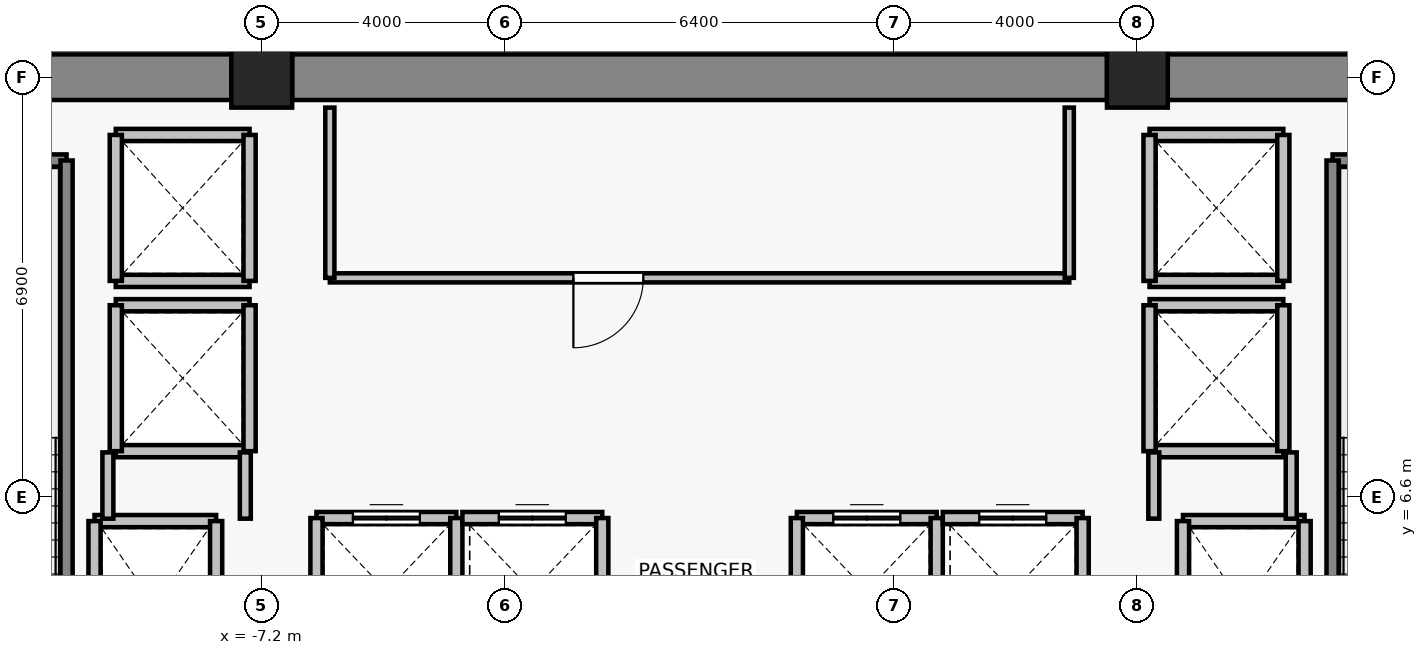
"""IFC4 building model, lengths in metres.
Left out: names, types, materials, properties, quantities, classifications, styles, units other than length and angle.
Written with IfcOpenShell. Run it as: python <this file> out.ifc"""

import sys

from ifc_helpers import new_model, si_unit, direction, frame, frame_2d, origin, origin_2d, place, context, subcontext, project, spatial, rectangle, extrude, source, transform, mapped, element, fill, save


model = new_model("IFC4")
c1 = context("Model", 3, precision=1e-05, world=origin(), true_north=direction((0.0, 1.0)))
c2 = subcontext(c1, "Body", "Model", "MODEL_VIEW")
j1 = project(units=[si_unit("LENGTHUNIT", "METRE"), si_unit("PLANEANGLEUNIT", "RADIAN")], contexts=[c1])
p1 = place(None, origin())
s1 = spatial("IfcSite", under=j1, at=p1, CompositionType="ELEMENT")
p2 = place(p1, origin())
s2 = spatial("IfcBuilding", under=s1, at=p2, CompositionType="ELEMENT")
p3 = place(p2, frame((0.0, 0.0, 162.7)))
s3 = spatial("IfcBuildingStorey", under=s2, at=p3, CompositionType="ELEMENT", Elevation=162.7)
for number, where, z_axis, x_axis in (
    (1, (-7.2, 13.5, 0.0), (0.0, 0.0, 1.0), (1.0, 0.0, 0.0)),
    (2, (7.2, 13.5, 0.0), (0.0, 0.0, 1.0), (1.0, 0.0, 0.0)),
):
    element("IfcColumn", number, at=place(p3, frame(where, z_axis=z_axis, x_axis=x_axis)), inside=s3, PredefinedType="COLUMN", context=c2, shape_type="SweptSolid", body=[
        extrude(rectangle(XDim=1.0, YDim=1.0, at=origin_2d()), origin(), (0.0, 0.0, 1.0), 3.3),
    ])
p4 = place(p3, frame((-13.9, 13.5, 0.0), z_axis=(0.0, 0.0, 1.0), x_axis=(1.0, 0.0, 0.0)))
e3 = element("IfcWall", 3, at=p4, inside=s3, PredefinedType="SHEAR", context=c2, shape_type="SweptSolid", body=[
    extrude(rectangle(XDim=6.2, YDim=0.75, at=frame_2d((3.1, 0.0))), origin(), (0.0, 0.0, 1.0), 3.075),
])
p5 = place(p3, frame((-6.7, 13.5, 0.0), z_axis=(0.0, 0.0, 1.0), x_axis=(1.0, 0.0, 0.0)))
e4 = element("IfcWall", 4, at=p5, inside=s3, PredefinedType="SHEAR", context=c2, shape_type="SweptSolid", body=[
    extrude(rectangle(XDim=13.4, YDim=0.75, at=frame_2d((6.7, 0.0))), origin(), (0.0, 0.0, 1.0), 3.075),
])
p6 = place(p3, frame((7.7, 13.5, 0.0), z_axis=(0.0, 0.0, 1.0), x_axis=(1.0, 0.0, 0.0)))
e5 = element("IfcWall", 5, at=p6, inside=s3, PredefinedType="SHEAR", context=c2, shape_type="SweptSolid", body=[
    extrude(rectangle(XDim=6.2, YDim=0.75, at=frame_2d((3.1, 0.0))), origin(), (0.0, 0.0, 1.0), 3.075),
])
p7 = place(p3, frame((-9.95, 6.2, 0.0), z_axis=(0.0, 0.0, 1.0), x_axis=(1.0, 0.0, 0.0)))
e6 = element("IfcWall", 6, at=p7, inside=s3, PredefinedType="SOLIDWALL", context=c2, shape_type="SweptSolid", body=[
    extrude(rectangle(XDim=2.0, YDim=0.2, at=frame_2d((1.0, 0.0))), origin(), (0.0, 0.0, 1.0), 3.075),
])
for number, where, z_axis, x_axis in (
    (7, (-9.95, 3.4, 0.0), (0.0, 0.0, 1.0), (0.0, 1.0, 0.0)),
    (8, (-7.95, 6.2, 0.0), (0.0, 0.0, 1.0), (0.0, -1.0, 0.0)),
):
    element("IfcWall", number, at=place(p3, frame(where, z_axis=z_axis, x_axis=x_axis)), inside=s3, PredefinedType="SOLIDWALL", context=c2, shape_type="SweptSolid", body=[
        extrude(rectangle(XDim=2.8, YDim=0.2, at=frame_2d((1.4, 0.0))), origin(), (0.0, 0.0, 1.0), 3.075),
    ])
p8 = place(p3, frame((7.95, 6.2, 0.0), z_axis=(0.0, 0.0, 1.0), x_axis=(1.0, 0.0, 0.0)))
e9 = element("IfcWall", 9, at=p8, inside=s3, PredefinedType="SOLIDWALL", context=c2, shape_type="SweptSolid", body=[
    extrude(rectangle(XDim=2.0, YDim=0.2, at=frame_2d((1.0, 0.0))), origin(), (0.0, 0.0, 1.0), 3.075),
])
for number, where, z_axis, x_axis in (
    (10, (7.95, 3.4, 0.0), (0.0, 0.0, 1.0), (0.0, 1.0, 0.0)),
    (11, (9.95, 6.2, 0.0), (0.0, 0.0, 1.0), (0.0, -1.0, 0.0)),
):
    element("IfcWall", number, at=place(p3, frame(where, z_axis=z_axis, x_axis=x_axis)), inside=s3, PredefinedType="SOLIDWALL", context=c2, shape_type="SweptSolid", body=[
        extrude(rectangle(XDim=2.8, YDim=0.2, at=frame_2d((1.4, 0.0))), origin(), (0.0, 0.0, 1.0), 3.075),
    ])
p9 = place(p3, frame((-6.3, 6.25, 0.0), z_axis=(0.0, 0.0, 1.0), x_axis=(1.0, 0.0, 0.0)))
e12 = element("IfcWall", 12, at=p9, inside=s3, PredefinedType="SOLIDWALL", context=c2, shape_type="SweptSolid", body=[
    extrude(rectangle(XDim=2.3, YDim=0.2, at=frame_2d((1.15, 0.0))), origin(), (0.0, 0.0, 1.0), 3.075),
])
p10 = place(p9, frame((0.6, 0.0, 0.0)))
e13 = element("IfcOpeningElement", 13, at=p10, cuts=e12, PredefinedType="OPENING", context=c2, shape_type="SweptSolid", body=[
    extrude(rectangle(XDim=1.1, YDim=2.2, at=frame_2d((0.55, 1.1))), frame((0.0, 0.11, 0.0), z_axis=(0.0, -1.0, 0.0), x_axis=(1.0, 0.0, 0.0)), (0.0, 0.0, 1.0), 0.22),
])
for number, where, z_axis, x_axis in (
    (14, (-6.3, 3.85, 0.0), (0.0, 0.0, 1.0), (0.0, 1.0, 0.0)),
    (15, (-4.0, 6.25, 0.0), (0.0, 0.0, 1.0), (0.0, -1.0, 0.0)),
):
    element("IfcWall", number, at=place(p3, frame(where, z_axis=z_axis, x_axis=x_axis)), inside=s3, PredefinedType="SOLIDWALL", context=c2, shape_type="SweptSolid", body=[
        extrude(rectangle(XDim=2.4, YDim=0.2, at=frame_2d((1.2, 0.0))), origin(), (0.0, 0.0, 1.0), 3.075),
    ])
p11 = place(p3, frame((-3.9, 6.25, 0.0), z_axis=(0.0, 0.0, 1.0), x_axis=(1.0, 0.0, 0.0)))
e16 = element("IfcWall", 16, at=p11, inside=s3, PredefinedType="SOLIDWALL", context=c2, shape_type="SweptSolid", body=[
    extrude(rectangle(XDim=2.3, YDim=0.2, at=frame_2d((1.15, 0.0))), origin(), (0.0, 0.0, 1.0), 3.075),
])
p12 = place(p11, frame((0.6, 0.0, 0.0)))
e17 = element("IfcOpeningElement", 17, at=p12, cuts=e16, PredefinedType="OPENING", context=c2, shape_type="SweptSolid", body=[
    extrude(rectangle(XDim=1.1, YDim=2.2, at=frame_2d((0.55, 1.1))), frame((0.0, 0.11, 0.0), z_axis=(0.0, -1.0, 0.0), x_axis=(1.0, 0.0, 0.0)), (0.0, 0.0, 1.0), 0.22),
])
p13 = place(p3, frame((-1.6, 6.25, 0.0), z_axis=(0.0, 0.0, 1.0), x_axis=(0.0, -1.0, 0.0)))
e18 = element("IfcWall", 18, at=p13, inside=s3, PredefinedType="SOLIDWALL", context=c2, shape_type="SweptSolid", body=[
    extrude(rectangle(XDim=2.4, YDim=0.2, at=frame_2d((1.2, 0.0))), origin(), (0.0, 0.0, 1.0), 3.075),
])
p14 = place(p3, frame((1.6, 6.25, 0.0), z_axis=(0.0, 0.0, 1.0), x_axis=(1.0, 0.0, 0.0)))
e19 = element("IfcWall", 19, at=p14, inside=s3, PredefinedType="SOLIDWALL", context=c2, shape_type="SweptSolid", body=[
    extrude(rectangle(XDim=2.3, YDim=0.2, at=frame_2d((1.15, 0.0))), origin(), (0.0, 0.0, 1.0), 3.075),
])
p15 = place(p14, frame((0.6, 0.0, 0.0)))
e20 = element("IfcOpeningElement", 20, at=p15, cuts=e19, PredefinedType="OPENING", context=c2, shape_type="SweptSolid", body=[
    extrude(rectangle(XDim=1.1, YDim=2.2, at=frame_2d((0.55, 1.1))), frame((0.0, 0.11, 0.0), z_axis=(0.0, -1.0, 0.0), x_axis=(1.0, 0.0, 0.0)), (0.0, 0.0, 1.0), 0.22),
])
for number, where, z_axis, x_axis in (
    (21, (1.6, 3.85, 0.0), (0.0, 0.0, 1.0), (0.0, 1.0, 0.0)),
    (22, (3.9, 6.25, 0.0), (0.0, 0.0, 1.0), (0.0, -1.0, 0.0)),
):
    element("IfcWall", number, at=place(p3, frame(where, z_axis=z_axis, x_axis=x_axis)), inside=s3, PredefinedType="SOLIDWALL", context=c2, shape_type="SweptSolid", body=[
        extrude(rectangle(XDim=2.4, YDim=0.2, at=frame_2d((1.2, 0.0))), origin(), (0.0, 0.0, 1.0), 3.075),
    ])
p16 = place(p3, frame((4.0, 6.25, 0.0), z_axis=(0.0, 0.0, 1.0), x_axis=(1.0, 0.0, 0.0)))
e23 = element("IfcWall", 23, at=p16, inside=s3, PredefinedType="SOLIDWALL", context=c2, shape_type="SweptSolid", body=[
    extrude(rectangle(XDim=2.3, YDim=0.2, at=frame_2d((1.15, 0.0))), origin(), (0.0, 0.0, 1.0), 3.075),
])
p17 = place(p16, frame((0.6, 0.0, 0.0)))
e24 = element("IfcOpeningElement", 24, at=p17, cuts=e23, PredefinedType="OPENING", context=c2, shape_type="SweptSolid", body=[
    extrude(rectangle(XDim=1.1, YDim=2.2, at=frame_2d((0.55, 1.1))), frame((0.0, 0.11, 0.0), z_axis=(0.0, -1.0, 0.0), x_axis=(1.0, 0.0, 0.0)), (0.0, 0.0, 1.0), 0.22),
])
p18 = place(p3, frame((6.3, 6.25, 0.0), z_axis=(0.0, 0.0, 1.0), x_axis=(0.0, -1.0, 0.0)))
e25 = element("IfcWall", 25, at=p18, inside=s3, PredefinedType="SOLIDWALL", context=c2, shape_type="SweptSolid", body=[
    extrude(rectangle(XDim=2.4, YDim=0.2, at=frame_2d((1.2, 0.0))), origin(), (0.0, 0.0, 1.0), 3.075),
])
for number, where, z_axis, x_axis in (
    (26, (-7.4, 7.35, 0.0), (0.0, 0.0, 1.0), (-1.0, 0.0, 0.0)),
    (27, (-9.6, 9.75, 0.0), (0.0, 0.0, 1.0), (1.0, 0.0, 0.0)),
):
    element("IfcWall", number, at=place(p3, frame(where, z_axis=z_axis, x_axis=x_axis)), inside=s3, PredefinedType="SOLIDWALL", context=c2, shape_type="SweptSolid", body=[
        extrude(rectangle(XDim=2.2, YDim=0.2, at=frame_2d((1.1, 0.0))), origin(), (0.0, 0.0, 1.0), 2.565),
    ])
p19 = place(p3, frame((-9.6, 7.35, 0.0), z_axis=(0.0, 0.0, 1.0), x_axis=(0.0, 1.0, 0.0)))
e28 = element("IfcWall", 28, at=p19, inside=s3, PredefinedType="SOLIDWALL", context=c2, shape_type="SweptSolid", body=[
    extrude(rectangle(XDim=2.4, YDim=0.2, at=frame_2d((1.2, 0.0))), origin(), (0.0, 0.0, 1.0), 3.075),
])
p20 = place(p3, frame((-7.4, 9.75, 0.0), z_axis=(0.0, 0.0, 1.0), x_axis=(0.0, -1.0, 0.0)))
e29 = element("IfcWall", 29, at=p20, inside=s3, PredefinedType="SOLIDWALL", context=c2, shape_type="SweptSolid", body=[
    extrude(rectangle(XDim=2.4, YDim=0.2, at=frame_2d((1.2, 0.0))), origin(), (0.0, 0.0, 1.0), 2.565),
])
for number, where, z_axis, x_axis in (
    (30, (-7.4, 10.15, 0.0), (0.0, 0.0, 1.0), (-1.0, 0.0, 0.0)),
    (31, (-9.6, 12.55, 0.0), (0.0, 0.0, 1.0), (1.0, 0.0, 0.0)),
):
    element("IfcWall", number, at=place(p3, frame(where, z_axis=z_axis, x_axis=x_axis)), inside=s3, PredefinedType="SOLIDWALL", context=c2, shape_type="SweptSolid", body=[
        extrude(rectangle(XDim=2.2, YDim=0.2, at=frame_2d((1.1, 0.0))), origin(), (0.0, 0.0, 1.0), 2.565),
    ])
p21 = place(p3, frame((-9.6, 10.15, 0.0), z_axis=(0.0, 0.0, 1.0), x_axis=(0.0, 1.0, 0.0)))
e32 = element("IfcWall", 32, at=p21, inside=s3, PredefinedType="SOLIDWALL", context=c2, shape_type="SweptSolid", body=[
    extrude(rectangle(XDim=2.4, YDim=0.2, at=frame_2d((1.2, 0.0))), origin(), (0.0, 0.0, 1.0), 3.075),
])
p22 = place(p3, frame((-7.4, 12.55, 0.0), z_axis=(0.0, 0.0, 1.0), x_axis=(0.0, -1.0, 0.0)))
e33 = element("IfcWall", 33, at=p22, inside=s3, PredefinedType="SOLIDWALL", context=c2, shape_type="SweptSolid", body=[
    extrude(rectangle(XDim=2.4, YDim=0.2, at=frame_2d((1.2, 0.0))), origin(), (0.0, 0.0, 1.0), 2.565),
])
for number, where, z_axis, x_axis in (
    (34, (9.6, 7.35, 0.0), (0.0, 0.0, 1.0), (-1.0, 0.0, 0.0)),
    (35, (7.4, 9.75, 0.0), (0.0, 0.0, 1.0), (1.0, 0.0, 0.0)),
):
    element("IfcWall", number, at=place(p3, frame(where, z_axis=z_axis, x_axis=x_axis)), inside=s3, PredefinedType="SOLIDWALL", context=c2, shape_type="SweptSolid", body=[
        extrude(rectangle(XDim=2.2, YDim=0.2, at=frame_2d((1.1, 0.0))), origin(), (0.0, 0.0, 1.0), 2.565),
    ])
p23 = place(p3, frame((7.4, 7.35, 0.0), z_axis=(0.0, 0.0, 1.0), x_axis=(0.0, 1.0, 0.0)))
e36 = element("IfcWall", 36, at=p23, inside=s3, PredefinedType="SOLIDWALL", context=c2, shape_type="SweptSolid", body=[
    extrude(rectangle(XDim=2.4, YDim=0.2, at=frame_2d((1.2, 0.0))), origin(), (0.0, 0.0, 1.0), 2.565),
])
p24 = place(p3, frame((9.6, 9.75, 0.0), z_axis=(0.0, 0.0, 1.0), x_axis=(0.0, -1.0, 0.0)))
e37 = element("IfcWall", 37, at=p24, inside=s3, PredefinedType="SOLIDWALL", context=c2, shape_type="SweptSolid", body=[
    extrude(rectangle(XDim=2.4, YDim=0.2, at=frame_2d((1.2, 0.0))), origin(), (0.0, 0.0, 1.0), 3.075),
])
for number, where, z_axis, x_axis in (
    (38, (9.6, 10.15, 0.0), (0.0, 0.0, 1.0), (-1.0, 0.0, 0.0)),
    (39, (7.4, 12.55, 0.0), (0.0, 0.0, 1.0), (1.0, 0.0, 0.0)),
):
    element("IfcWall", number, at=place(p3, frame(where, z_axis=z_axis, x_axis=x_axis)), inside=s3, PredefinedType="SOLIDWALL", context=c2, shape_type="SweptSolid", body=[
        extrude(rectangle(XDim=2.2, YDim=0.2, at=frame_2d((1.1, 0.0))), origin(), (0.0, 0.0, 1.0), 2.565),
    ])
p25 = place(p3, frame((7.4, 10.15, 0.0), z_axis=(0.0, 0.0, 1.0), x_axis=(0.0, 1.0, 0.0)))
e40 = element("IfcWall", 40, at=p25, inside=s3, PredefinedType="SOLIDWALL", context=c2, shape_type="SweptSolid", body=[
    extrude(rectangle(XDim=2.4, YDim=0.2, at=frame_2d((1.2, 0.0))), origin(), (0.0, 0.0, 1.0), 2.565),
])
p26 = place(p3, frame((9.6, 12.55, 0.0), z_axis=(0.0, 0.0, 1.0), x_axis=(0.0, -1.0, 0.0)))
e41 = element("IfcWall", 41, at=p26, inside=s3, PredefinedType="SOLIDWALL", context=c2, shape_type="SweptSolid", body=[
    extrude(rectangle(XDim=2.4, YDim=0.2, at=frame_2d((1.2, 0.0))), origin(), (0.0, 0.0, 1.0), 3.075),
])
p27 = place(p3, frame((-13.93, 12.13, 0.0), z_axis=(0.0, 0.0, 1.0), x_axis=(1.0, 0.0, 0.0)))
e42 = element("IfcWall", 42, at=p27, inside=s3, PredefinedType="SOLIDWALL", context=c2, shape_type="SweptSolid", body=[
    extrude(rectangle(XDim=3.52, YDim=0.2, at=frame_2d((1.76, 0.0))), origin(), (0.0, 0.0, 1.0), 3.075),
])
p28 = place(p3, frame((-10.41, 12.13, 0.0), z_axis=(0.0, 0.0, 1.0), x_axis=(0.0, -1.0, 0.0)))
e43 = element("IfcWall", 43, at=p28, inside=s3, PredefinedType="SOLIDWALL", context=c2, shape_type="SweptSolid", body=[
    extrude(rectangle(XDim=8.84, YDim=0.2, at=frame_2d((4.42, 0.0))), origin(), (0.0, 0.0, 1.0), 3.075),
])
p29 = place(p3, frame((10.41, 12.13, 0.0), z_axis=(0.0, 0.0, 1.0), x_axis=(1.0, 0.0, 0.0)))
e44 = element("IfcWall", 44, at=p29, inside=s3, PredefinedType="SOLIDWALL", context=c2, shape_type="SweptSolid", body=[
    extrude(rectangle(XDim=3.52, YDim=0.2, at=frame_2d((1.76, 0.0))), origin(), (0.0, 0.0, 1.0), 3.075),
])
p30 = place(p3, frame((10.41, 3.29, 0.0), z_axis=(0.0, 0.0, 1.0), x_axis=(0.0, 1.0, 0.0)))
e45 = element("IfcWall", 45, at=p30, inside=s3, PredefinedType="SOLIDWALL", context=c2, shape_type="SweptSolid", body=[
    extrude(rectangle(XDim=8.84, YDim=0.2, at=frame_2d((4.42, 0.0))), origin(), (0.0, 0.0, 1.0), 3.075),
])
p31 = place(p3, frame((-9.73, 6.24, 0.0), z_axis=(0.0, 0.0, 1.0), x_axis=(0.0, 1.0, 0.0)))
e46 = element("IfcWall", 46, at=p31, inside=s3, PredefinedType="PARTITIONING", context=c2, shape_type="SweptSolid", body=[
    extrude(rectangle(XDim=1.09, YDim=0.18, at=frame_2d((0.545, 0.0))), origin(), (0.0, 0.0, 1.0), 3.075),
])
for number, where, z_axis, x_axis in (
    (47, (-7.47, 7.33, 0.0), (0.0, 0.0, 1.0), (0.0, -1.0, 0.0)),
    (48, (7.47, 6.24, 0.0), (0.0, 0.0, 1.0), (0.0, 1.0, 0.0)),
):
    element("IfcWall", number, at=place(p3, frame(where, z_axis=z_axis, x_axis=x_axis)), inside=s3, PredefinedType="PARTITIONING", context=c2, shape_type="SweptSolid", body=[
        extrude(rectangle(XDim=1.09, YDim=0.18, at=frame_2d((0.545, 0.0))), origin(), (0.0, 0.0, 1.0), 2.565),
    ])
p32 = place(p3, frame((9.73, 7.33, 0.0), z_axis=(0.0, 0.0, 1.0), x_axis=(0.0, -1.0, 0.0)))
e49 = element("IfcWall", 49, at=p32, inside=s3, PredefinedType="PARTITIONING", context=c2, shape_type="SweptSolid", body=[
    extrude(rectangle(XDim=1.09, YDim=0.18, at=frame_2d((0.545, 0.0))), origin(), (0.0, 0.0, 1.0), 3.075),
])
p33 = place(p3, frame((6.08, 10.2, 0.0), z_axis=(0.0, 0.0, 1.0), x_axis=(-1.0, 0.0, 0.0)))
e50 = element("IfcWall", 50, at=p33, inside=s3, PredefinedType="PARTITIONING", context=c2, shape_type="SweptSolid", body=[
    extrude(rectangle(XDim=12.16, YDim=0.15, at=frame_2d((6.08, 0.0))), origin(), (0.0, 0.0, 1.0), 3.075),
])
p34 = place(p33, frame((7.005, 0.0, 0.0)))
e51 = element("IfcOpeningElement", 51, at=p34, cuts=e50, PredefinedType="OPENING", context=c2, shape_type="SweptSolid", body=[
    extrude(rectangle(XDim=1.15, YDim=2.15, at=frame_2d((0.575, 1.075))), frame((0.0, 0.085, 0.0), z_axis=(0.0, -1.0, 0.0), x_axis=(1.0, 0.0, 0.0)), (0.0, 0.0, 1.0), 0.17),
])
for number, where, z_axis, x_axis in (
    (52, (-6.08, 10.2, 0.0), (0.0, 0.0, 1.0), (0.0, 1.0, 0.0)),
    (53, (6.08, 13.0, 0.0), (0.0, 0.0, 1.0), (0.0, -1.0, 0.0)),
):
    element("IfcWall", number, at=place(p3, frame(where, z_axis=z_axis, x_axis=x_axis)), inside=s3, PredefinedType="PARTITIONING", context=c2, shape_type="SweptSolid", body=[
        extrude(rectangle(XDim=2.8, YDim=0.15, at=frame_2d((1.4, 0.0))), origin(), (0.0, 0.0, 1.0), 3.075),
    ])
m1 = source(origin(), c2, "Body", "SweptSolid", [
    extrude(rectangle(XDim=1.1, YDim=2.2, at=frame_2d((0.55, 1.1))), frame((0.0, 0.025, 0.0), z_axis=(0.0, -1.0, 0.0), x_axis=(1.0, 0.0, 0.0)), (0.0, 0.0, 1.0), 0.05),
])
p35 = place(p10, origin())
e54 = element("IfcDoor", 54, at=p35, inside=s3, OperationType="DOUBLE_DOOR_SLIDING", PredefinedType="DOOR", context=c2, shape_type="MappedRepresentation", body=[
    mapped(m1, transform((0.0, 0.0, 0.0), x_axis=(1.0, 0.0, 0.0), y_axis=(0.0, 1.0, 0.0), z_axis=(0.0, 0.0, 1.0), scale=1.0)),
])
fill(e13, e54)
p36 = place(p12, origin())
e55 = element("IfcDoor", 55, at=p36, inside=s3, OperationType="DOUBLE_DOOR_SLIDING", PredefinedType="DOOR", context=c2, shape_type="MappedRepresentation", body=[
    mapped(m1, transform((0.0, 0.0, 0.0), x_axis=(1.0, 0.0, 0.0), y_axis=(0.0, 1.0, 0.0), z_axis=(0.0, 0.0, 1.0), scale=1.0)),
])
fill(e17, e55)
p37 = place(p15, origin())
e56 = element("IfcDoor", 56, at=p37, inside=s3, OperationType="DOUBLE_DOOR_SLIDING", PredefinedType="DOOR", context=c2, shape_type="MappedRepresentation", body=[
    mapped(m1, transform((0.0, 0.0, 0.0), x_axis=(1.0, 0.0, 0.0), y_axis=(0.0, 1.0, 0.0), z_axis=(0.0, 0.0, 1.0), scale=1.0)),
])
fill(e20, e56)
p38 = place(p17, origin())
e57 = element("IfcDoor", 57, at=p38, inside=s3, OperationType="DOUBLE_DOOR_SLIDING", PredefinedType="DOOR", context=c2, shape_type="MappedRepresentation", body=[
    mapped(m1, transform((0.0, 0.0, 0.0), x_axis=(1.0, 0.0, 0.0), y_axis=(0.0, 1.0, 0.0), z_axis=(0.0, 0.0, 1.0), scale=1.0)),
])
fill(e24, e57)
m2 = source(origin(), c2, "Body", "SweptSolid", [
    extrude(rectangle(XDim=1.15, YDim=2.15, at=frame_2d((0.575, 1.075))), frame((0.0, 0.025, 0.0), z_axis=(0.0, -1.0, 0.0), x_axis=(1.0, 0.0, 0.0)), (0.0, 0.0, 1.0), 0.05),
])
p39 = place(p34, origin())
e58 = element("IfcDoor", 58, at=p39, inside=s3, OperationType="SINGLE_SWING_RIGHT", PredefinedType="DOOR", context=c2, shape_type="MappedRepresentation", body=[
    mapped(m2, transform((0.0, 0.0, 0.0), x_axis=(1.0, 0.0, 0.0), y_axis=(0.0, 1.0, 0.0), z_axis=(0.0, 0.0, 1.0), scale=1.0)),
])
fill(e51, e58)
save(model, sys.argv[1])
